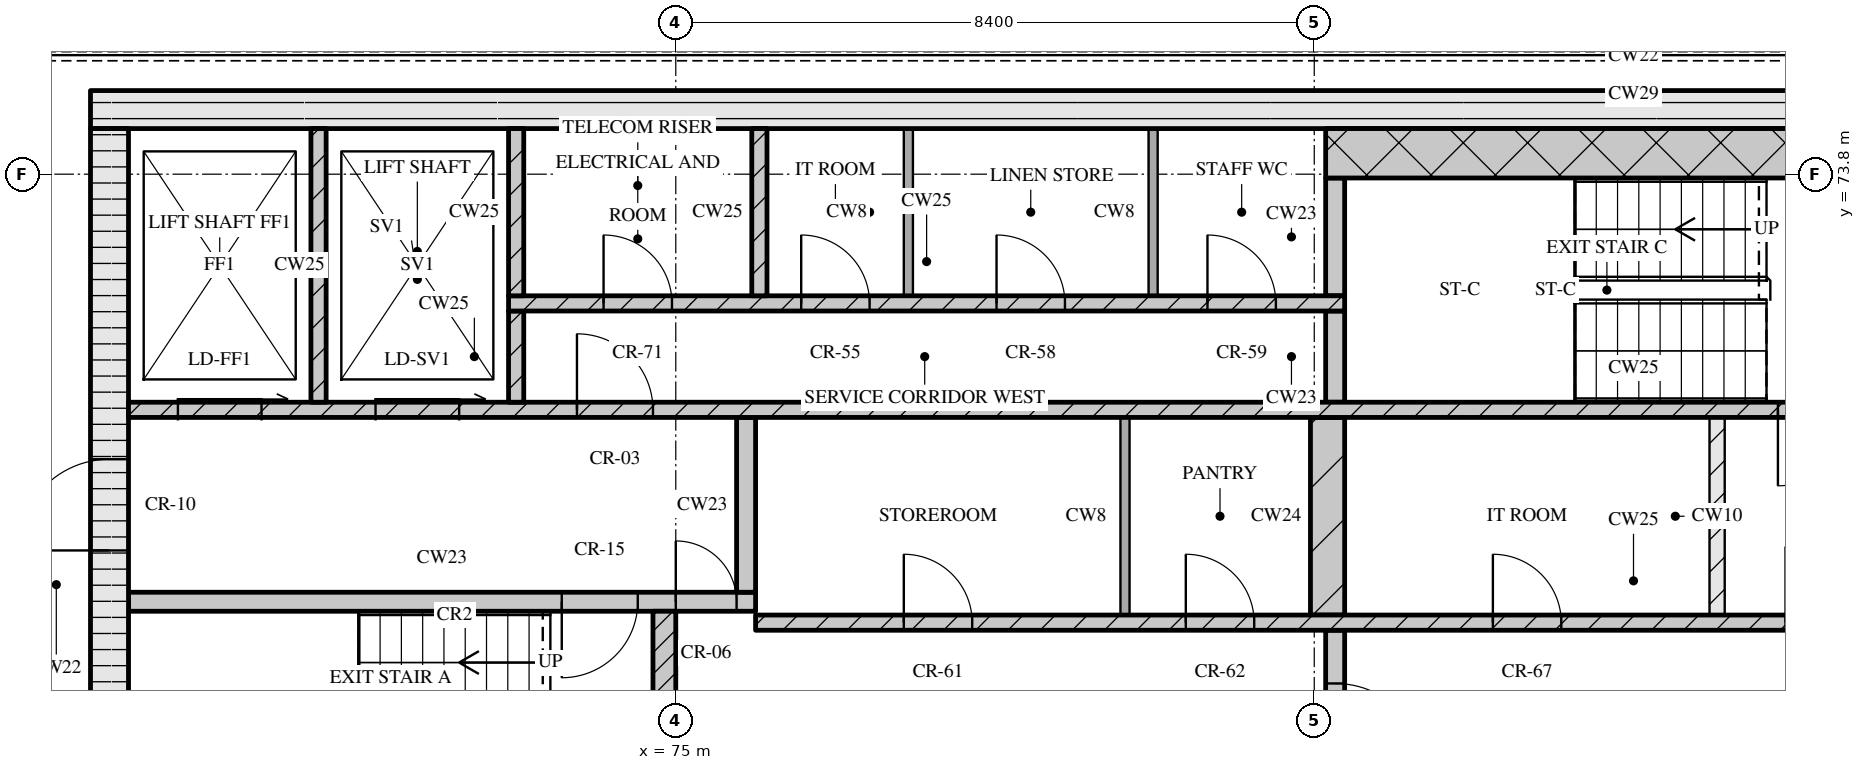
"""IFC4 building model, lengths in metres.
Left out: names, types, materials, properties, quantities, classifications, styles, units other than length and angle.
Written with IfcOpenShell. Run it as: python <this file> out.ifc"""

import sys

from ifc_helpers import new_model, si_unit, direction, frame, frame_2d, origin, place, context, subcontext, project, spatial, rectangle, extrude, element, fill, save


model = new_model("IFC4")
c1 = context("Model", 3, precision=1e-05, world=origin(), true_north=direction((0.0, 1.0)))
c2 = subcontext(c1, "Body", "Model", "MODEL_VIEW")
j1 = project(units=[si_unit("LENGTHUNIT", "METRE"), si_unit("PLANEANGLEUNIT", "RADIAN")], contexts=[c1])
p1 = place(None, origin())
s1 = spatial("IfcSite", under=j1, at=p1, CompositionType="ELEMENT")
p2 = place(p1, origin())
s2 = spatial("IfcBuilding", under=s1, at=p2, CompositionType="ELEMENT")
p3 = place(p2, frame((0.0, 0.0, 295.95)))
s3 = spatial("IfcBuildingStorey", under=s2, at=p3, CompositionType="ELEMENT", Elevation=295.95)
p4 = place(p3, frame((67.3, 74.65, 0.0), z_axis=(0.0, 0.0, 1.0), x_axis=(1.0, 0.0, 0.0)))
e1 = element("IfcWall", 1, at=p4, inside=s3, PredefinedType="SOLIDWALL", context=c2, shape_type="SweptSolid", body=[
    extrude(rectangle(XDim=40.6, YDim=0.5, at=frame_2d((20.3, 0.0))), origin(), (0.0, 0.0, 1.0), 3.32),
])
p5 = place(p3, frame((67.55, 62.4, 0.0), z_axis=(0.0, 0.0, 1.0), x_axis=(0.0, 1.0, 0.0)))
e2 = element("IfcWall", 2, at=p5, inside=s3, PredefinedType="SOLIDWALL", context=c2, shape_type="SweptSolid", body=[
    extrude(rectangle(XDim=12.0, YDim=0.5, at=frame_2d((6.0, 0.0))), origin(), (0.0, 0.0, 1.0), 3.32),
])
p6 = place(p5, frame((6.45, 0.0, 0.0)))
e3 = element("IfcOpeningElement", 3, at=p6, cuts=e2, PredefinedType="OPENING", context=c2, shape_type="SweptSolid", body=[
    extrude(rectangle(XDim=1.2, YDim=2.1, at=frame_2d((0.6, 1.05))), frame((0.0, 0.26, 0.0), z_axis=(0.0, -1.0, 0.0), x_axis=(1.0, 0.0, 0.0)), (0.0, 0.0, 1.0), 0.52),
])
p7 = place(p3, frame((74.85, 65.2, 0.0), z_axis=(0.0, 0.0, 1.0), x_axis=(0.0, 1.0, 0.0)))
e4 = element("IfcWall", 4, at=p7, inside=s3, PredefinedType="SOLIDWALL", context=c2, shape_type="SweptSolid", body=[
    extrude(rectangle(XDim=2.85, YDim=0.3, at=frame_2d((1.425, 0.0))), origin(), (0.0, 0.0, 1.0), 3.32),
])
p8 = place(p3, frame((83.675, 65.2, 0.0), z_axis=(0.0, 0.0, 1.0), x_axis=(0.0, 1.0, 0.0)))
e5 = element("IfcWall", 5, at=p8, inside=s3, PredefinedType="SOLIDWALL", context=c2, shape_type="SweptSolid", body=[
    extrude(rectangle(XDim=2.6, YDim=0.25, at=frame_2d((1.3, 0.0))), origin(), (0.0, 0.0, 1.0), 3.32),
])
p9 = place(p8, frame((0.7, 0.0, 0.0)))
e6 = element("IfcOpeningElement", 6, at=p9, cuts=e5, PredefinedType="OPENING", context=c2, shape_type="SweptSolid", body=[
    extrude(rectangle(XDim=1.2, YDim=2.1, at=frame_2d((0.6, 1.05))), frame((0.0, 0.135, 0.0), z_axis=(0.0, -1.0, 0.0), x_axis=(1.0, 0.0, 0.0)), (0.0, 0.0, 1.0), 0.27),
])
p10 = place(p3, frame((76.05, 67.9, 0.0), z_axis=(0.0, 0.0, 1.0), x_axis=(1.0, 0.0, 0.0)))
e7 = element("IfcWall", 7, at=p10, inside=s3, PredefinedType="SOLIDWALL", context=c2, shape_type="SweptSolid", body=[
    extrude(rectangle(XDim=23.1, YDim=0.2, at=frame_2d((11.55, 0.0))), origin(), (0.0, 0.0, 1.0), 3.32),
])
p11 = place(p10, frame((1.95, 0.0, 0.0)))
e8 = element("IfcOpeningElement", 8, at=p11, cuts=e7, PredefinedType="OPENING", context=c2, shape_type="SweptSolid", body=[
    extrude(rectangle(XDim=0.9, YDim=2.1, at=frame_2d((0.45, 1.05))), frame((0.0, 0.11, 0.0), z_axis=(0.0, -1.0, 0.0), x_axis=(1.0, 0.0, 0.0)), (0.0, 0.0, 1.0), 0.22),
])
p12 = place(p10, frame((5.66, 0.0, 0.0)))
e9 = element("IfcOpeningElement", 9, at=p12, cuts=e7, PredefinedType="OPENING", context=c2, shape_type="SweptSolid", body=[
    extrude(rectangle(XDim=0.9, YDim=2.1, at=frame_2d((0.45, 1.05))), frame((0.0, 0.11, 0.0), z_axis=(0.0, -1.0, 0.0), x_axis=(1.0, 0.0, 0.0)), (0.0, 0.0, 1.0), 0.22),
])
p13 = place(p10, frame((9.7, 0.0, 0.0)))
e10 = element("IfcOpeningElement", 10, at=p13, cuts=e7, PredefinedType="OPENING", context=c2, shape_type="SweptSolid", body=[
    extrude(rectangle(XDim=0.9, YDim=2.1, at=frame_2d((0.45, 1.05))), frame((0.0, 0.11, 0.0), z_axis=(0.0, -1.0, 0.0), x_axis=(1.0, 0.0, 0.0)), (0.0, 0.0, 1.0), 0.22),
])
p14 = place(p10, frame((13.55, 0.0, 0.0)))
e11 = element("IfcOpeningElement", 11, at=p14, cuts=e7, PredefinedType="OPENING", context=c2, shape_type="SweptSolid", body=[
    extrude(rectangle(XDim=1.0, YDim=2.1, at=frame_2d((0.5, 1.05))), frame((0.0, 0.11, 0.0), z_axis=(0.0, -1.0, 0.0), x_axis=(1.0, 0.0, 0.0)), (0.0, 0.0, 1.0), 0.22),
])
p15 = place(p10, frame((16.2, 0.0, 0.0)))
e12 = element("IfcOpeningElement", 12, at=p15, cuts=e7, PredefinedType="OPENING", context=c2, shape_type="SweptSolid", body=[
    extrude(rectangle(XDim=1.1, YDim=2.1, at=frame_2d((0.55, 1.05))), frame((0.0, 0.11, 0.0), z_axis=(0.0, -1.0, 0.0), x_axis=(1.0, 0.0, 0.0)), (0.0, 0.0, 1.0), 0.22),
])
p16 = place(p10, frame((18.7, 0.0, 0.0)))
e13 = element("IfcOpeningElement", 13, at=p16, cuts=e7, PredefinedType="OPENING", context=c2, shape_type="SweptSolid", body=[
    extrude(rectangle(XDim=1.1, YDim=2.1, at=frame_2d((0.55, 1.05))), frame((0.0, 0.11, 0.0), z_axis=(0.0, -1.0, 0.0), x_axis=(1.0, 0.0, 0.0)), (0.0, 0.0, 1.0), 0.22),
])
p17 = place(p10, frame((21.2, 0.0, 0.0)))
e14 = element("IfcOpeningElement", 14, at=p17, cuts=e7, PredefinedType="OPENING", context=c2, shape_type="SweptSolid", body=[
    extrude(rectangle(XDim=1.1, YDim=2.1, at=frame_2d((0.55, 1.05))), frame((0.0, 0.11, 0.0), z_axis=(0.0, -1.0, 0.0), x_axis=(1.0, 0.0, 0.0)), (0.0, 0.0, 1.0), 0.22),
])
p18 = place(p3, frame((80.91, 68.0, 0.0), z_axis=(0.0, 0.0, 1.0), x_axis=(0.0, 1.0, 0.0)))
e15 = element("IfcWall", 15, at=p18, inside=s3, PredefinedType="PARTITIONING", context=c2, shape_type="SweptSolid", body=[
    extrude(rectangle(XDim=2.6, YDim=0.12, at=frame_2d((1.3, 0.0))), origin(), (0.0, 0.0, 1.0), 3.32),
])
p19 = place(p3, frame((83.575, 68.0, 0.0), z_axis=(0.0, 0.0, 1.0), x_axis=(0.0, 1.0, 0.0)))
e16 = element("IfcWall", 16, at=p19, inside=s3, PredefinedType="SOLIDWALL", context=c2, shape_type="SweptSolid", body=[
    extrude(rectangle(XDim=2.6, YDim=0.45, at=frame_2d((1.3, 0.0))), origin(), (0.0, 0.0, 1.0), 3.32),
])
p20 = place(p3, frame((88.7, 68.0, 0.0), z_axis=(0.0, 0.0, 1.0), x_axis=(0.0, 1.0, 0.0)))
e17 = element("IfcWall", 17, at=p20, inside=s3, PredefinedType="PARTITIONING", context=c2, shape_type="SweptSolid", body=[
    extrude(rectangle(XDim=2.6, YDim=0.2, at=frame_2d((1.3, 0.0))), origin(), (0.0, 0.0, 1.0), 3.32),
])
p21 = place(p3, frame((67.8, 68.175, 0.0), z_axis=(0.0, 0.0, 1.0), x_axis=(1.0, 0.0, 0.0)))
e18 = element("IfcWall", 18, at=p21, inside=s3, PredefinedType="SOLIDWALL", context=c2, shape_type="SweptSolid", body=[
    extrude(rectangle(XDim=8.25, YDim=0.25, at=frame_2d((4.125, 0.0))), origin(), (0.0, 0.0, 1.0), 3.32),
])
p22 = place(p21, frame((5.7, 0.0, 0.0)))
e19 = element("IfcOpeningElement", 19, at=p22, cuts=e18, PredefinedType="OPENING", context=c2, shape_type="SweptSolid", body=[
    extrude(rectangle(XDim=1.0, YDim=2.1, at=frame_2d((0.5, 1.05))), frame((0.0, 0.135, 0.0), z_axis=(0.0, -1.0, 0.0), x_axis=(1.0, 0.0, 0.0)), (0.0, 0.0, 1.0), 0.27),
])
p23 = place(p21, frame((7.2, 0.0, 0.0)))
e20 = element("IfcOpeningElement", 20, at=p23, cuts=e18, PredefinedType="OPENING", context=c2, shape_type="SweptSolid", body=[
    extrude(rectangle(XDim=0.8, YDim=2.1, at=frame_2d((0.4, 1.05))), frame((0.0, 0.135, 0.0), z_axis=(0.0, -1.0, 0.0), x_axis=(1.0, 0.0, 0.0)), (0.0, 0.0, 1.0), 0.27),
])
p24 = place(p3, frame((75.925, 68.3, 0.0), z_axis=(0.0, 0.0, 1.0), x_axis=(0.0, 1.0, 0.0)))
e21 = element("IfcWall", 21, at=p24, inside=s3, PredefinedType="SOLIDWALL", context=c2, shape_type="SweptSolid", body=[
    extrude(rectangle(XDim=2.3, YDim=0.25, at=frame_2d((1.15, 0.0))), origin(), (0.0, 0.0, 1.0), 3.32),
])
p25 = place(p3, frame((67.8, 70.7, 0.0), z_axis=(0.0, 0.0, 1.0), x_axis=(1.0, 0.0, 0.0)))
e22 = element("IfcWall", 22, at=p25, inside=s3, PredefinedType="SOLIDWALL", context=c2, shape_type="SweptSolid", body=[
    extrude(rectangle(XDim=39.6, YDim=0.2, at=frame_2d((19.8, 0.0))), origin(), (0.0, 0.0, 1.0), 3.32),
])
p26 = place(p25, frame((0.65, 0.0, 0.0)))
e23 = element("IfcOpeningElement", 23, at=p26, cuts=e22, PredefinedType="OPENING", context=c2, shape_type="SweptSolid", body=[
    extrude(rectangle(XDim=1.1, YDim=2.1, at=frame_2d((0.55, 1.05))), frame((0.0, 0.11, 0.0), z_axis=(0.0, -1.0, 0.0), x_axis=(1.0, 0.0, 0.0)), (0.0, 0.0, 1.0), 0.22),
])
p27 = place(p25, frame((3.25, 0.0, 0.0)))
e24 = element("IfcOpeningElement", 24, at=p27, cuts=e22, PredefinedType="OPENING", context=c2, shape_type="SweptSolid", body=[
    extrude(rectangle(XDim=1.1, YDim=2.1, at=frame_2d((0.55, 1.05))), frame((0.0, 0.11, 0.0), z_axis=(0.0, -1.0, 0.0), x_axis=(1.0, 0.0, 0.0)), (0.0, 0.0, 1.0), 0.22),
])
p28 = place(p25, frame((5.9, 0.0, 0.0)))
e25 = element("IfcOpeningElement", 25, at=p28, cuts=e22, PredefinedType="OPENING", context=c2, shape_type="SweptSolid", body=[
    extrude(rectangle(XDim=1.0, YDim=2.1, at=frame_2d((0.5, 1.05))), frame((0.0, 0.11, 0.0), z_axis=(0.0, -1.0, 0.0), x_axis=(1.0, 0.0, 0.0)), (0.0, 0.0, 1.0), 0.22),
])
p29 = place(p25, frame((21.7, 0.0, 0.0)))
e26 = element("IfcOpeningElement", 26, at=p29, cuts=e22, PredefinedType="OPENING", context=c2, shape_type="SweptSolid", body=[
    extrude(rectangle(XDim=1.0, YDim=2.1, at=frame_2d((0.5, 1.05))), frame((0.0, 0.11, 0.0), z_axis=(0.0, -1.0, 0.0), x_axis=(1.0, 0.0, 0.0)), (0.0, 0.0, 1.0), 0.22),
])
p30 = place(p25, frame((32.7, 0.0, 0.0)))
e27 = element("IfcOpeningElement", 27, at=p30, cuts=e22, PredefinedType="OPENING", context=c2, shape_type="SweptSolid", body=[
    extrude(rectangle(XDim=1.0, YDim=2.1, at=frame_2d((0.5, 1.05))), frame((0.0, 0.11, 0.0), z_axis=(0.0, -1.0, 0.0), x_axis=(1.0, 0.0, 0.0)), (0.0, 0.0, 1.0), 0.22),
])
p31 = place(p25, frame((35.25, 0.0, 0.0)))
e28 = element("IfcOpeningElement", 28, at=p31, cuts=e22, PredefinedType="OPENING", context=c2, shape_type="SweptSolid", body=[
    extrude(rectangle(XDim=1.1, YDim=2.1, at=frame_2d((0.55, 1.05))), frame((0.0, 0.11, 0.0), z_axis=(0.0, -1.0, 0.0), x_axis=(1.0, 0.0, 0.0)), (0.0, 0.0, 1.0), 0.22),
])
p32 = place(p25, frame((37.85, 0.0, 0.0)))
e29 = element("IfcOpeningElement", 29, at=p32, cuts=e22, PredefinedType="OPENING", context=c2, shape_type="SweptSolid", body=[
    extrude(rectangle(XDim=1.1, YDim=2.1, at=frame_2d((0.55, 1.05))), frame((0.0, 0.11, 0.0), z_axis=(0.0, -1.0, 0.0), x_axis=(1.0, 0.0, 0.0)), (0.0, 0.0, 1.0), 0.22),
])
p33 = place(p3, frame((70.3, 70.8, 0.0), z_axis=(0.0, 0.0, 1.0), x_axis=(0.0, 1.0, 0.0)))
e30 = element("IfcWall", 30, at=p33, inside=s3, PredefinedType="SOLIDWALL", context=c2, shape_type="SweptSolid", body=[
    extrude(rectangle(XDim=3.6, YDim=0.2, at=frame_2d((1.8, 0.0))), origin(), (0.0, 0.0, 1.0), 3.32),
])
p34 = place(p3, frame((72.9, 70.8, 0.0), z_axis=(0.0, 0.0, 1.0), x_axis=(0.0, 1.0, 0.0)))
e31 = element("IfcWall", 31, at=p34, inside=s3, PredefinedType="SOLIDWALL", context=c2, shape_type="SweptSolid", body=[
    extrude(rectangle(XDim=1.2, YDim=0.2, at=frame_2d((0.6, 0.0))), origin(), (0.0, 0.0, 1.0), 3.32),
])
p35 = place(p3, frame((83.675, 70.8, 0.0), z_axis=(0.0, 0.0, 1.0), x_axis=(0.0, 1.0, 0.0)))
e32 = element("IfcWall", 32, at=p35, inside=s3, PredefinedType="SOLIDWALL", context=c2, shape_type="SweptSolid", body=[
    extrude(rectangle(XDim=1.2, YDim=0.25, at=frame_2d((0.6, 0.0))), origin(), (0.0, 0.0, 1.0), 3.32),
])
p36 = place(p3, frame((72.8, 72.1, 0.0), z_axis=(0.0, 0.0, 1.0), x_axis=(1.0, 0.0, 0.0)))
e33 = element("IfcWall", 33, at=p36, inside=s3, PredefinedType="SOLIDWALL", context=c2, shape_type="SweptSolid", body=[
    extrude(rectangle(XDim=11.0, YDim=0.2, at=frame_2d((5.5, 0.0))), origin(), (0.0, 0.0, 1.0), 3.32),
])
p37 = place(p36, frame((1.25, 0.0, 0.0)))
e34 = element("IfcOpeningElement", 34, at=p37, cuts=e33, PredefinedType="OPENING", context=c2, shape_type="SweptSolid", body=[
    extrude(rectangle(XDim=0.9, YDim=2.1, at=frame_2d((0.45, 1.05))), frame((0.0, 0.11, 0.0), z_axis=(0.0, -1.0, 0.0), x_axis=(1.0, 0.0, 0.0)), (0.0, 0.0, 1.0), 0.22),
])
p38 = place(p36, frame((3.85, 0.0, 0.0)))
e35 = element("IfcOpeningElement", 35, at=p38, cuts=e33, PredefinedType="OPENING", context=c2, shape_type="SweptSolid", body=[
    extrude(rectangle(XDim=0.9, YDim=2.1, at=frame_2d((0.45, 1.05))), frame((0.0, 0.11, 0.0), z_axis=(0.0, -1.0, 0.0), x_axis=(1.0, 0.0, 0.0)), (0.0, 0.0, 1.0), 0.22),
])
p39 = place(p36, frame((6.42, 0.0, 0.0)))
e36 = element("IfcOpeningElement", 36, at=p39, cuts=e33, PredefinedType="OPENING", context=c2, shape_type="SweptSolid", body=[
    extrude(rectangle(XDim=0.9, YDim=2.1, at=frame_2d((0.45, 1.05))), frame((0.0, 0.11, 0.0), z_axis=(0.0, -1.0, 0.0), x_axis=(1.0, 0.0, 0.0)), (0.0, 0.0, 1.0), 0.22),
])
p40 = place(p36, frame((9.195, 0.0, 0.0)))
e37 = element("IfcOpeningElement", 37, at=p40, cuts=e33, PredefinedType="OPENING", context=c2, shape_type="SweptSolid", body=[
    extrude(rectangle(XDim=0.9, YDim=2.1, at=frame_2d((0.45, 1.05))), frame((0.0, 0.11, 0.0), z_axis=(0.0, -1.0, 0.0), x_axis=(1.0, 0.0, 0.0)), (0.0, 0.0, 1.0), 0.22),
])
for number, where, z_axis, x_axis in (
    (38, (72.9, 72.2, 0.0), (0.0, 0.0, 1.0), (0.0, 1.0, 0.0)),
    (39, (76.1, 72.2, 0.0), (0.0, 0.0, 1.0), (0.0, 1.0, 0.0)),
):
    element("IfcWall", number, at=place(p3, frame(where, z_axis=z_axis, x_axis=x_axis)), inside=s3, PredefinedType="SOLIDWALL", context=c2, shape_type="SweptSolid", body=[
        extrude(rectangle(XDim=2.2, YDim=0.2, at=frame_2d((1.1, 0.0))), origin(), (0.0, 0.0, 1.0), 3.32),
    ])
for number, where, z_axis, x_axis in (
    (40, (78.06, 72.2, 0.0), (0.0, 0.0, 1.0), (0.0, 1.0, 0.0)),
    (41, (81.28, 72.2, 0.0), (0.0, 0.0, 1.0), (0.0, 1.0, 0.0)),
):
    element("IfcWall", number, at=place(p3, frame(where, z_axis=z_axis, x_axis=x_axis)), inside=s3, PredefinedType="PARTITIONING", context=c2, shape_type="SweptSolid", body=[
        extrude(rectangle(XDim=2.2, YDim=0.12, at=frame_2d((1.1, 0.0))), origin(), (0.0, 0.0, 1.0), 3.32),
    ])
p41 = place(p3, frame((83.675, 72.2, 0.0), z_axis=(0.0, 0.0, 1.0), x_axis=(0.0, 1.0, 0.0)))
e42 = element("IfcWall", 42, at=p41, inside=s3, PredefinedType="SOLIDWALL", context=c2, shape_type="SweptSolid", body=[
    extrude(rectangle(XDim=1.55, YDim=0.25, at=frame_2d((0.775, 0.0))), origin(), (0.0, 0.0, 1.0), 3.32),
])
p42 = place(p3, frame((83.55, 74.075, 0.0), z_axis=(0.0, 0.0, 1.0), x_axis=(1.0, 0.0, 0.0)))
e43 = element("IfcWall", 43, at=p42, inside=s3, PredefinedType="SOLIDWALL", context=c2, shape_type="SweptSolid", body=[
    extrude(rectangle(XDim=8.1, YDim=0.65, at=frame_2d((4.05, 0.0))), origin(), (0.0, 0.0, 1.0), 3.32),
])
p43 = place(p9, origin())
e44 = element("IfcDoor", 44, at=p43, inside=s3, OperationType="SINGLE_SWING_RIGHT", PredefinedType="DOOR", context=c2, shape_type="SweptSolid", body=[
    extrude(rectangle(XDim=1.2, YDim=2.1, at=frame_2d((0.6, 1.05))), frame((0.0, 0.025, 0.0), z_axis=(0.0, -1.0, 0.0), x_axis=(1.0, 0.0, 0.0)), (0.0, 0.0, 1.0), 0.05),
])
fill(e6, e44)
p44 = place(p11, origin())
e45 = element("IfcDoor", 45, at=p44, inside=s3, OperationType="SINGLE_SWING_LEFT", PredefinedType="DOOR", context=c2, shape_type="SweptSolid", body=[
    extrude(rectangle(XDim=0.9, YDim=2.1, at=frame_2d((0.45, 1.05))), frame((0.0, 0.025, 0.0), z_axis=(0.0, -1.0, 0.0), x_axis=(1.0, 0.0, 0.0)), (0.0, 0.0, 1.0), 0.05),
])
fill(e8, e45)
p45 = place(p12, origin())
e46 = element("IfcDoor", 46, at=p45, inside=s3, OperationType="SINGLE_SWING_LEFT", PredefinedType="DOOR", context=c2, shape_type="SweptSolid", body=[
    extrude(rectangle(XDim=0.9, YDim=2.1, at=frame_2d((0.45, 1.05))), frame((0.0, 0.025, 0.0), z_axis=(0.0, -1.0, 0.0), x_axis=(1.0, 0.0, 0.0)), (0.0, 0.0, 1.0), 0.05),
])
fill(e9, e46)
p46 = place(p13, origin())
e47 = element("IfcDoor", 47, at=p46, inside=s3, OperationType="SINGLE_SWING_LEFT", PredefinedType="DOOR", context=c2, shape_type="SweptSolid", body=[
    extrude(rectangle(XDim=0.9, YDim=2.1, at=frame_2d((0.45, 1.05))), frame((0.0, 0.025, 0.0), z_axis=(0.0, -1.0, 0.0), x_axis=(1.0, 0.0, 0.0)), (0.0, 0.0, 1.0), 0.05),
])
fill(e10, e47)
p47 = place(p22, origin())
e48 = element("IfcDoor", 48, at=p47, inside=s3, OperationType="SINGLE_SWING_RIGHT", PredefinedType="DOOR", context=c2, shape_type="SweptSolid", body=[
    extrude(rectangle(XDim=1.0, YDim=2.1, at=frame_2d((0.5, 1.05))), frame((0.0, 0.025, 0.0), z_axis=(0.0, -1.0, 0.0), x_axis=(1.0, 0.0, 0.0)), (0.0, 0.0, 1.0), 0.05),
])
fill(e19, e48)
p48 = place(p23, origin())
e49 = element("IfcDoor", 49, at=p48, inside=s3, OperationType="SINGLE_SWING_LEFT", PredefinedType="DOOR", context=c2, shape_type="SweptSolid", body=[
    extrude(rectangle(XDim=0.8, YDim=2.1, at=frame_2d((0.4, 1.05))), frame((0.0, 0.025, 0.0), z_axis=(0.0, -1.0, 0.0), x_axis=(1.0, 0.0, 0.0)), (0.0, 0.0, 1.0), 0.05),
])
fill(e20, e49)
p49 = place(p6, origin())
e50 = element("IfcDoor", 50, at=p49, inside=s3, OperationType="SINGLE_SWING_LEFT", PredefinedType="DOOR", context=c2, shape_type="SweptSolid", body=[
    extrude(rectangle(XDim=1.2, YDim=2.1, at=frame_2d((0.6, 1.05))), frame((0.0, 0.025, 0.0), z_axis=(0.0, -1.0, 0.0), x_axis=(1.0, 0.0, 0.0)), (0.0, 0.0, 1.0), 0.05),
])
fill(e3, e50)
p50 = place(p26, origin())
e51 = element("IfcDoor", 51, at=p50, inside=s3, OperationType="SLIDING_TO_RIGHT", PredefinedType="DOOR", context=c2, shape_type="SweptSolid", body=[
    extrude(rectangle(XDim=1.1, YDim=2.1, at=frame_2d((0.55, 1.05))), frame((0.0, 0.025, 0.0), z_axis=(0.0, -1.0, 0.0), x_axis=(1.0, 0.0, 0.0)), (0.0, 0.0, 1.0), 0.05),
])
fill(e23, e51)
p51 = place(p27, origin())
e52 = element("IfcDoor", 52, at=p51, inside=s3, OperationType="SLIDING_TO_RIGHT", PredefinedType="DOOR", context=c2, shape_type="SweptSolid", body=[
    extrude(rectangle(XDim=1.1, YDim=2.1, at=frame_2d((0.55, 1.05))), frame((0.0, 0.025, 0.0), z_axis=(0.0, -1.0, 0.0), x_axis=(1.0, 0.0, 0.0)), (0.0, 0.0, 1.0), 0.05),
])
fill(e24, e52)
p52 = place(p28, origin())
e53 = element("IfcDoor", 53, at=p52, inside=s3, OperationType="SINGLE_SWING_LEFT", PredefinedType="DOOR", context=c2, shape_type="SweptSolid", body=[
    extrude(rectangle(XDim=1.0, YDim=2.1, at=frame_2d((0.5, 1.05))), frame((0.0, 0.025, 0.0), z_axis=(0.0, -1.0, 0.0), x_axis=(1.0, 0.0, 0.0)), (0.0, 0.0, 1.0), 0.05),
])
fill(e25, e53)
p53 = place(p29, origin())
e54 = element("IfcDoor", 54, at=p53, inside=s3, OperationType="SINGLE_SWING_RIGHT", PredefinedType="DOOR", context=c2, shape_type="SweptSolid", body=[
    extrude(rectangle(XDim=1.0, YDim=2.1, at=frame_2d((0.5, 1.05))), frame((0.0, 0.025, 0.0), z_axis=(0.0, -1.0, 0.0), x_axis=(1.0, 0.0, 0.0)), (0.0, 0.0, 1.0), 0.05),
])
fill(e26, e54)
p54 = place(p37, origin())
e55 = element("IfcDoor", 55, at=p54, inside=s3, OperationType="SINGLE_SWING_LEFT", PredefinedType="DOOR", context=c2, shape_type="SweptSolid", body=[
    extrude(rectangle(XDim=0.9, YDim=2.1, at=frame_2d((0.45, 1.05))), frame((0.0, 0.025, 0.0), z_axis=(0.0, -1.0, 0.0), x_axis=(1.0, 0.0, 0.0)), (0.0, 0.0, 1.0), 0.05),
])
fill(e34, e55)
p55 = place(p38, origin())
e56 = element("IfcDoor", 56, at=p55, inside=s3, OperationType="SINGLE_SWING_LEFT", PredefinedType="DOOR", context=c2, shape_type="SweptSolid", body=[
    extrude(rectangle(XDim=0.9, YDim=2.1, at=frame_2d((0.45, 1.05))), frame((0.0, 0.025, 0.0), z_axis=(0.0, -1.0, 0.0), x_axis=(1.0, 0.0, 0.0)), (0.0, 0.0, 1.0), 0.05),
])
fill(e35, e56)
p56 = place(p39, origin())
e57 = element("IfcDoor", 57, at=p56, inside=s3, OperationType="SINGLE_SWING_LEFT", PredefinedType="DOOR", context=c2, shape_type="SweptSolid", body=[
    extrude(rectangle(XDim=0.9, YDim=2.1, at=frame_2d((0.45, 1.05))), frame((0.0, 0.025, 0.0), z_axis=(0.0, -1.0, 0.0), x_axis=(1.0, 0.0, 0.0)), (0.0, 0.0, 1.0), 0.05),
])
fill(e36, e57)
p57 = place(p40, origin())
e58 = element("IfcDoor", 58, at=p57, inside=s3, OperationType="SINGLE_SWING_LEFT", PredefinedType="DOOR", context=c2, shape_type="SweptSolid", body=[
    extrude(rectangle(XDim=0.9, YDim=2.1, at=frame_2d((0.45, 1.05))), frame((0.0, 0.025, 0.0), z_axis=(0.0, -1.0, 0.0), x_axis=(1.0, 0.0, 0.0)), (0.0, 0.0, 1.0), 0.05),
])
fill(e37, e58)
save(model, sys.argv[1])
